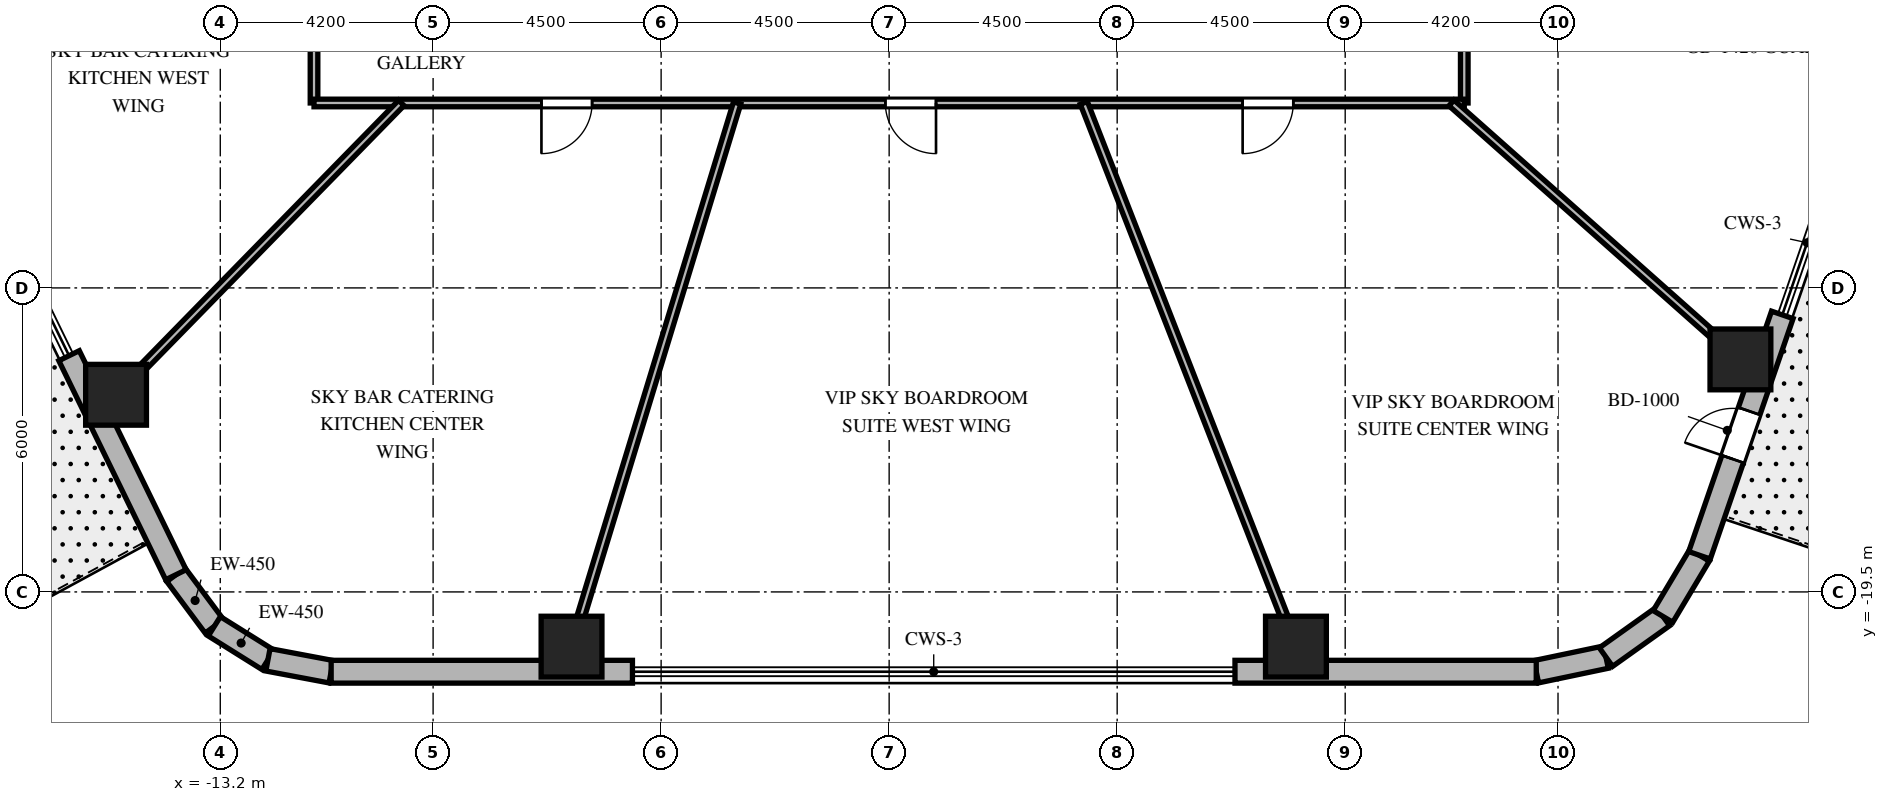
"""IFC4 building model, lengths in metres.
Left out: names, types, materials, properties, quantities, classifications, styles, units other than length and angle.
Written with IfcOpenShell. Run it as: python <this file> out.ifc"""

import sys

from ifc_helpers import new_model, si_unit, direction, frame, frame_2d, origin, origin_2d, place, context, subcontext, project, spatial, rectangle, extrude, element, fill, save


model = new_model("IFC4")
c1 = context("Model", 3, precision=1e-05, world=origin(), true_north=direction((0.0, 1.0)))
c2 = subcontext(c1, "Body", "Model", "MODEL_VIEW")
j1 = project(units=[si_unit("LENGTHUNIT", "METRE"), si_unit("PLANEANGLEUNIT", "RADIAN")], contexts=[c1])
p1 = place(None, origin())
s1 = spatial("IfcSite", under=j1, at=p1, CompositionType="ELEMENT")
p2 = place(p1, origin())
s2 = spatial("IfcBuilding", under=s1, at=p2, CompositionType="ELEMENT")
p3 = place(p2, frame((0.0, 0.0, 139.5)))
s3 = spatial("IfcBuildingStorey", under=s2, at=p3, CompositionType="ELEMENT", Elevation=139.5)
for number, where, z_axis, x_axis in (
    (1, (-6.268, -20.58, 0.0), (0.0, 0.0, 1.0), (1.0, 0.0, 0.0)),
    (2, (8.028, -20.58, 0.0), (0.0, 0.0, 1.0), (1.0, 0.0, 0.0)),
    (3, (16.8, -14.911, 0.0), (0.0, 0.0, 1.0), (1.0, 0.0, 0.0)),
    (4, (-15.257, -15.609, 0.0), (0.0, 0.0, 1.0), (1.0, 0.0, 0.0)),
):
    element("IfcColumn", number, at=place(p3, frame(where, z_axis=z_axis, x_axis=x_axis)), inside=s3, PredefinedType="COLUMN", context=c2, shape_type="SweptSolid", body=[
        extrude(rectangle(XDim=1.2, YDim=1.2, at=origin_2d()), origin(), (0.0, 0.0, 1.0), 4.8),
    ])
p4 = place(p3, frame((-14.076, -19.161, 0.0), z_axis=(0.0, 0.0, 1.0), x_axis=(0.597226657159, -0.802072515412, 0.0)))
e5 = element("IfcWall", 5, at=p4, inside=s3, PredefinedType="SOLIDWALL", context=c2, shape_type="SweptSolid", body=[
    extrude(rectangle(XDim=1.269, YDim=0.45, at=frame_2d((0.635, 0.0))), origin(), (0.0, 0.0, 1.0), 4.5),
])
p5 = place(p3, frame((-13.318, -20.179, 0.0), z_axis=(0.0, 0.0, 1.0), x_axis=(0.848031272749, -0.529946186362, 0.0)))
e6 = element("IfcWall", 6, at=p5, inside=s3, PredefinedType="SOLIDWALL", context=c2, shape_type="SweptSolid", body=[
    extrude(rectangle(XDim=1.248, YDim=0.45, at=frame_2d((0.624, 0.0))), origin(), (0.0, 0.0, 1.0), 4.5),
])
p6 = place(p3, frame((-12.259, -20.84, 0.0), z_axis=(0.0, 0.0, 1.0), x_axis=(0.982730354425, -0.185043374624, 0.0)))
e7 = element("IfcWall", 7, at=p6, inside=s3, PredefinedType="SOLIDWALL", context=c2, shape_type="SweptSolid", body=[
    extrude(rectangle(XDim=1.269, YDim=0.45, at=frame_2d((0.635, 0.0))), origin(), (0.0, 0.0, 1.0), 4.5),
])
p7 = place(p3, frame((12.771, -21.075, 0.0), z_axis=(0.0, 0.0, 1.0), x_axis=(0.97874281988, 0.205091424819, 0.0)))
e8 = element("IfcWall", 8, at=p7, inside=s3, PredefinedType="SOLIDWALL", context=c2, shape_type="SweptSolid", body=[
    extrude(rectangle(XDim=1.406, YDim=0.45, at=frame_2d((0.703, 0.0))), origin(), (0.0, 0.0, 1.0), 4.5),
])
p8 = place(p3, frame((14.146, -20.787, 0.0), z_axis=(0.0, 0.0, 1.0), x_axis=(0.814162929117, 0.580636482536, 0.0)))
e9 = element("IfcWall", 9, at=p8, inside=s3, PredefinedType="SOLIDWALL", context=c2, shape_type="SweptSolid", body=[
    extrude(rectangle(XDim=1.382, YDim=0.45, at=frame_2d((0.691, 0.0))), origin(), (0.0, 0.0, 1.0), 4.5),
])
p9 = place(p3, frame((15.272, -19.984, 0.0), z_axis=(0.0, 0.0, 1.0), x_axis=(0.512579347361, 0.858639862025, 0.0)))
e10 = element("IfcWall", 10, at=p9, inside=s3, PredefinedType="SOLIDWALL", context=c2, shape_type="SweptSolid", body=[
    extrude(rectangle(XDim=1.406, YDim=0.45, at=frame_2d((0.703, 0.0))), origin(), (0.0, 0.0, 1.0), 4.5),
])
p10 = place(p3, frame((-11.012, -21.075, 0.0), z_axis=(0.0, 0.0, 1.0), x_axis=(1.0, 0.0, 0.0)))
e11 = element("IfcWall", 11, at=p10, inside=s3, PredefinedType="SOLIDWALL", context=c2, shape_type="SweptSolid", body=[
    extrude(rectangle(XDim=5.946, YDim=0.45, at=frame_2d((2.973, 0.0))), origin(), (0.0, 0.0, 1.0), 4.5),
])
p11 = place(p3, frame((6.825, -21.075, 0.0), z_axis=(0.0, 0.0, 1.0), x_axis=(1.0, 0.0, 0.0)))
e12 = element("IfcWall", 12, at=p11, inside=s3, PredefinedType="SOLIDWALL", context=c2, shape_type="SweptSolid", body=[
    extrude(rectangle(XDim=5.946, YDim=0.45, at=frame_2d((2.973, 0.0))), origin(), (0.0, 0.0, 1.0), 4.5),
])
p12 = place(p3, frame((15.992, -18.777, 0.0), z_axis=(0.0, 0.0, 1.0), x_axis=(0.325626313688, 0.945498547769, 0.0)))
e13 = element("IfcWall", 13, at=p12, inside=s3, PredefinedType="SOLIDWALL", context=c2, shape_type="SweptSolid", body=[
    extrude(rectangle(XDim=5.018, YDim=0.45, at=frame_2d((2.509, 0.0))), origin(), (0.0, 0.0, 1.0), 4.5),
])
p13 = place(p12, frame((2.009, 0.0, 0.0)))
e14 = element("IfcOpeningElement", 14, at=p13, cuts=e13, PredefinedType="OPENING", context=c2, shape_type="SweptSolid", body=[
    extrude(rectangle(XDim=1.0, YDim=2.15, at=frame_2d((0.5, 1.075))), frame((0.0, 0.235, 0.0), z_axis=(0.0, -1.0, 0.0), x_axis=(1.0, 0.0, 0.0)), (0.0, 0.0, 1.0), 0.47),
])
p14 = place(p3, frame((-16.184, -14.838, 0.0), z_axis=(0.0, 0.0, 1.0), x_axis=(0.43837962648, -0.898789910428, 0.0)))
e15 = element("IfcWall", 15, at=p14, inside=s3, PredefinedType="SOLIDWALL", context=c2, shape_type="SweptSolid", body=[
    extrude(rectangle(XDim=4.81, YDim=0.45, at=frame_2d((2.405, 0.0))), origin(), (0.0, 0.0, 1.0), 4.5),
])
p15 = place(p3, frame((-11.35, -9.85, 0.0), z_axis=(0.0, 0.0, 1.0), x_axis=(0.0, 1.0, 0.0)))
e16 = element("IfcWall", 16, at=p15, inside=s3, PredefinedType="PARTITIONING", context=c2, shape_type="SweptSolid", body=[
    extrude(rectangle(XDim=19.7, YDim=0.15, at=frame_2d((9.85, 0.0))), origin(), (0.0, 0.0, 1.0), 2.69),
])
p16 = place(p15, frame((15.18, 0.0, 0.0)))
e17 = element("IfcOpeningElement", 17, at=p16, cuts=e16, PredefinedType="OPENING", context=c2, shape_type="SweptSolid", body=[
    extrude(rectangle(XDim=1.0, YDim=2.03, at=frame_2d((0.5, 1.015))), frame((0.0, 0.085, 0.0), z_axis=(0.0, -1.0, 0.0), x_axis=(1.0, 0.0, 0.0)), (0.0, 0.0, 1.0), 0.17),
])
p17 = place(p15, frame((8.811, 0.0, 0.0)))
e18 = element("IfcOpeningElement", 18, at=p17, cuts=e16, PredefinedType="OPENING", context=c2, shape_type="SweptSolid", body=[
    extrude(rectangle(XDim=1.0, YDim=2.03, at=frame_2d((0.5, 1.015))), frame((0.0, 0.085, 0.0), z_axis=(0.0, -1.0, 0.0), x_axis=(1.0, 0.0, 0.0)), (0.0, 0.0, 1.0), 0.17),
])
p18 = place(p15, frame((2.983, 0.0, 0.0)))
e19 = element("IfcOpeningElement", 19, at=p18, cuts=e16, PredefinedType="OPENING", context=c2, shape_type="SweptSolid", body=[
    extrude(rectangle(XDim=1.0, YDim=2.03, at=frame_2d((0.5, 1.015))), frame((0.0, 0.085, 0.0), z_axis=(0.0, -1.0, 0.0), x_axis=(1.0, 0.0, 0.0)), (0.0, 0.0, 1.0), 0.17),
])
p19 = place(p3, frame((11.35, 9.85, 0.0), z_axis=(0.0, 0.0, 1.0), x_axis=(0.0, -1.0, 0.0)))
e20 = element("IfcWall", 20, at=p19, inside=s3, PredefinedType="PARTITIONING", context=c2, shape_type="SweptSolid", body=[
    extrude(rectangle(XDim=19.7, YDim=0.15, at=frame_2d((9.85, 0.0))), origin(), (0.0, 0.0, 1.0), 2.69),
])
p20 = place(p19, frame((2.983, 0.0, 0.0)))
e21 = element("IfcOpeningElement", 21, at=p20, cuts=e20, PredefinedType="OPENING", context=c2, shape_type="SweptSolid", body=[
    extrude(rectangle(XDim=1.0, YDim=2.03, at=frame_2d((0.5, 1.015))), frame((0.0, 0.085, 0.0), z_axis=(0.0, -1.0, 0.0), x_axis=(1.0, 0.0, 0.0)), (0.0, 0.0, 1.0), 0.17),
])
p21 = place(p19, frame((15.18, 0.0, 0.0)))
e22 = element("IfcOpeningElement", 22, at=p21, cuts=e20, PredefinedType="OPENING", context=c2, shape_type="SweptSolid", body=[
    extrude(rectangle(XDim=1.0, YDim=2.03, at=frame_2d((0.5, 1.015))), frame((0.0, 0.085, 0.0), z_axis=(0.0, -1.0, 0.0), x_axis=(1.0, 0.0, 0.0)), (0.0, 0.0, 1.0), 0.17),
])
p22 = place(p19, frame((8.811, 0.0, 0.0)))
e23 = element("IfcOpeningElement", 23, at=p22, cuts=e20, PredefinedType="OPENING", context=c2, shape_type="SweptSolid", body=[
    extrude(rectangle(XDim=1.0, YDim=2.03, at=frame_2d((0.5, 1.015))), frame((0.0, 0.085, 0.0), z_axis=(0.0, -1.0, 0.0), x_axis=(1.0, 0.0, 0.0)), (0.0, 0.0, 1.0), 0.17),
])
p23 = place(p3, frame((11.35, -9.85, 0.0), z_axis=(0.0, 0.0, 1.0), x_axis=(-1.0, 0.0, 0.0)))
e24 = element("IfcWall", 24, at=p23, inside=s3, PredefinedType="PARTITIONING", context=c2, shape_type="SweptSolid", body=[
    extrude(rectangle(XDim=22.7, YDim=0.15, at=frame_2d((11.35, 0.0))), origin(), (0.0, 0.0, 1.0), 2.69),
])
p24 = place(p23, frame((17.212, 0.0, 0.0)))
e25 = element("IfcOpeningElement", 25, at=p24, cuts=e24, PredefinedType="OPENING", context=c2, shape_type="SweptSolid", body=[
    extrude(rectangle(XDim=1.0, YDim=2.03, at=frame_2d((0.5, 1.015))), frame((0.0, 0.085, 0.0), z_axis=(0.0, -1.0, 0.0), x_axis=(1.0, 0.0, 0.0)), (0.0, 0.0, 1.0), 0.17),
])
p25 = place(p23, frame((10.425, 0.0, 0.0)))
e26 = element("IfcOpeningElement", 26, at=p25, cuts=e24, PredefinedType="OPENING", context=c2, shape_type="SweptSolid", body=[
    extrude(rectangle(XDim=1.0, YDim=2.03, at=frame_2d((0.5, 1.015))), frame((0.0, 0.085, 0.0), z_axis=(0.0, -1.0, 0.0), x_axis=(1.0, 0.0, 0.0)), (0.0, 0.0, 1.0), 0.17),
])
p26 = place(p23, frame((3.374, 0.0, 0.0)))
e27 = element("IfcOpeningElement", 27, at=p26, cuts=e24, PredefinedType="OPENING", context=c2, shape_type="SweptSolid", body=[
    extrude(rectangle(XDim=1.0, YDim=2.03, at=frame_2d((0.5, 1.015))), frame((0.0, 0.085, 0.0), z_axis=(0.0, -1.0, 0.0), x_axis=(1.0, 0.0, 0.0)), (0.0, 0.0, 1.0), 0.17),
])
p27 = place(p3, frame((-9.628, -9.85, 0.0), z_axis=(0.0, 0.0, 1.0), x_axis=(-0.698992824326, -0.715128681805, 0.0)))
e28 = element("IfcWall", 28, at=p27, inside=s3, PredefinedType="PARTITIONING", context=c2, shape_type="SweptSolid", body=[
    extrude(rectangle(XDim=8.579, YDim=0.15, at=frame_2d((4.29, 0.0))), origin(), (0.0, 0.0, 1.0), 2.69),
])
p28 = place(p3, frame((-3.0, -9.85, 0.0), z_axis=(0.0, 0.0, 1.0), x_axis=(-0.291352035382, -0.95661590593, 0.0)))
e29 = element("IfcWall", 29, at=p28, inside=s3, PredefinedType="PARTITIONING", context=c2, shape_type="SweptSolid", body=[
    extrude(rectangle(XDim=11.734, YDim=0.15, at=frame_2d((5.867, 0.0))), origin(), (0.0, 0.0, 1.0), 2.69),
])
p29 = place(p3, frame((3.842, -9.85, 0.0), z_axis=(0.0, 0.0, 1.0), x_axis=(0.363432685593, -0.931620460833, 0.0)))
e30 = element("IfcWall", 30, at=p29, inside=s3, PredefinedType="PARTITIONING", context=c2, shape_type="SweptSolid", body=[
    extrude(rectangle(XDim=12.049, YDim=0.15, at=frame_2d((6.024, 0.0))), origin(), (0.0, 0.0, 1.0), 2.69),
])
p30 = place(p3, frame((11.098, -9.85, 0.0), z_axis=(0.0, 0.0, 1.0), x_axis=(0.747904295103, -0.663806572253, 0.0)))
e31 = element("IfcWall", 31, at=p30, inside=s3, PredefinedType="PARTITIONING", context=c2, shape_type="SweptSolid", body=[
    extrude(rectangle(XDim=8.16, YDim=0.15, at=frame_2d((4.08, 0.0))), origin(), (0.0, 0.0, 1.0), 2.69),
])
p31 = place(p13, origin())
e32 = element("IfcDoor", 32, at=p31, inside=s3, OperationType="SINGLE_SWING_LEFT", PredefinedType="DOOR", context=c2, shape_type="SweptSolid", body=[
    extrude(rectangle(XDim=1.0, YDim=2.15, at=frame_2d((0.5, 1.075))), frame((0.0, 0.025, 0.0), z_axis=(0.0, -1.0, 0.0), x_axis=(1.0, 0.0, 0.0)), (0.0, 0.0, 1.0), 0.05),
])
fill(e14, e32)
p32 = place(p24, origin())
e33 = element("IfcDoor", 33, at=p32, inside=s3, OperationType="SINGLE_SWING_RIGHT", PredefinedType="DOOR", context=c2, shape_type="SweptSolid", body=[
    extrude(rectangle(XDim=1.0, YDim=2.03, at=frame_2d((0.5, 1.015))), frame((0.0, 0.025, 0.0), z_axis=(0.0, -1.0, 0.0), x_axis=(1.0, 0.0, 0.0)), (0.0, 0.0, 1.0), 0.05),
])
fill(e25, e33)
p33 = place(p25, origin())
e34 = element("IfcDoor", 34, at=p33, inside=s3, OperationType="SINGLE_SWING_LEFT", PredefinedType="DOOR", context=c2, shape_type="SweptSolid", body=[
    extrude(rectangle(XDim=1.0, YDim=2.03, at=frame_2d((0.5, 1.015))), frame((0.0, 0.025, 0.0), z_axis=(0.0, -1.0, 0.0), x_axis=(1.0, 0.0, 0.0)), (0.0, 0.0, 1.0), 0.05),
])
fill(e26, e34)
p34 = place(p26, origin())
e35 = element("IfcDoor", 35, at=p34, inside=s3, OperationType="SINGLE_SWING_RIGHT", PredefinedType="DOOR", context=c2, shape_type="SweptSolid", body=[
    extrude(rectangle(XDim=1.0, YDim=2.03, at=frame_2d((0.5, 1.015))), frame((0.0, 0.025, 0.0), z_axis=(0.0, -1.0, 0.0), x_axis=(1.0, 0.0, 0.0)), (0.0, 0.0, 1.0), 0.05),
])
fill(e27, e35)
save(model, sys.argv[1])
